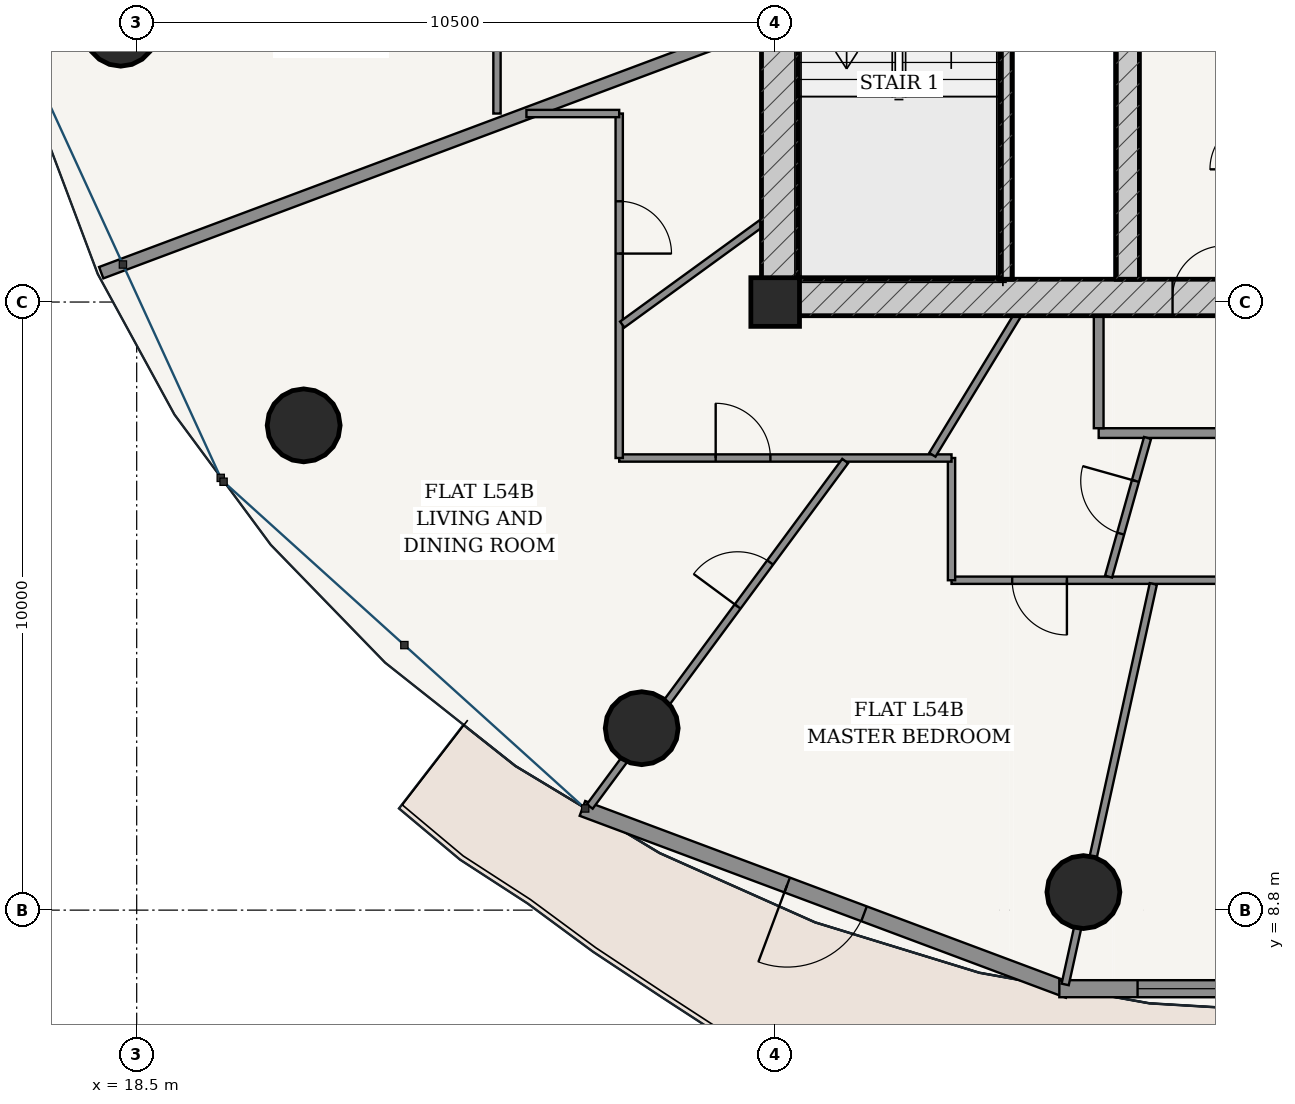
"""IFC4 building model, lengths in metres.
Left out: names, types, materials, properties, quantities, classifications, styles, units other than length and angle.
Written with IfcOpenShell. Run it as: python <this file> out.ifc"""

import sys

from ifc_helpers import new_model, si_unit, direction, frame, frame_2d, origin, origin_2d, place, context, subcontext, project, spatial, rectangle, hollow_circle, extrude, source, transform, mapped, element, fill, save


model = new_model("IFC4")
c1 = context("Model", 3, precision=1e-05, world=origin(), true_north=direction((-0.2419218956, 0.970295726276)))
c2 = subcontext(c1, "Body", "Model", "MODEL_VIEW")
j1 = project(units=[si_unit("LENGTHUNIT", "METRE"), si_unit("PLANEANGLEUNIT", "RADIAN")], contexts=[c1])
p1 = place(None, origin())
s1 = spatial("IfcSite", under=j1, at=p1, CompositionType="ELEMENT")
p2 = place(p1, origin())
s2 = spatial("IfcBuilding", under=s1, at=p2, CompositionType="ELEMENT")
p3 = place(p2, frame((0.0, 0.0, 206.0)))
s3 = spatial("IfcBuildingStorey", under=s2, at=p3, CompositionType="ELEMENT", Elevation=206.0)
p4 = place(p3, frame((29.0, 18.8, 0.0), z_axis=(0.0, 0.0, 1.0), x_axis=(1.0, 0.0, 0.0)))
e1 = element("IfcColumn", 1, at=p4, inside=s3, PredefinedType="COLUMN", context=c2, shape_type="SweptSolid", body=[
    extrude(rectangle(XDim=0.8, YDim=0.8, at=origin_2d()), origin(), (0.0, 0.0, 1.0), 3.7),
])
p5 = place(p3, frame((28.775, 18.875, 0.0), z_axis=(0.0, 0.0, 1.0), x_axis=(1.0, 0.0, 0.0)))
e2 = element("IfcWall", 2, at=p5, inside=s3, PredefinedType="SHEAR", context=c2, shape_type="SweptSolid", body=[
    extrude(rectangle(XDim=18.45, YDim=0.6, at=frame_2d((9.225, 0.0))), origin(), (0.0, 0.0, 1.0), 3.435),
])
p6 = place(p5, frame((6.76, 0.0, 0.0)))
e3 = element("IfcOpeningElement", 3, at=p6, cuts=e2, PredefinedType="OPENING", context=c2, shape_type="SweptSolid", body=[
    extrude(rectangle(XDim=0.85, YDim=2.1, at=frame_2d((0.425, 1.05))), frame((0.0, 0.31, 0.0), z_axis=(0.0, -1.0, 0.0), x_axis=(1.0, 0.0, 0.0)), (0.0, 0.0, 1.0), 0.62),
])
p7 = place(p5, frame((8.8, 0.0, 0.0)))
e4 = element("IfcOpeningElement", 4, at=p7, cuts=e2, PredefinedType="OPENING", context=c2, shape_type="SweptSolid", body=[
    extrude(rectangle(XDim=0.85, YDim=2.1, at=frame_2d((0.425, 1.05))), frame((0.0, 0.31, 0.0), z_axis=(0.0, -1.0, 0.0), x_axis=(1.0, 0.0, 0.0)), (0.0, 0.0, 1.0), 0.62),
])
p8 = place(p5, frame((10.84, 0.0, 0.0)))
e5 = element("IfcOpeningElement", 5, at=p8, cuts=e2, PredefinedType="OPENING", context=c2, shape_type="SweptSolid", body=[
    extrude(rectangle(XDim=0.85, YDim=2.1, at=frame_2d((0.425, 1.05))), frame((0.0, 0.31, 0.0), z_axis=(0.0, -1.0, 0.0), x_axis=(1.0, 0.0, 0.0)), (0.0, 0.0, 1.0), 0.62),
])
p9 = place(p3, frame((29.075, 19.175, 0.0), z_axis=(0.0, 0.0, 1.0), x_axis=(0.0, 1.0, 0.0)))
e6 = element("IfcWall", 6, at=p9, inside=s3, PredefinedType="SHEAR", context=c2, shape_type="SweptSolid", body=[
    extrude(rectangle(XDim=15.25, YDim=0.6, at=frame_2d((7.625, 0.0))), origin(), (0.0, 0.0, 1.0), 3.435),
])
p10 = place(p9, frame((9.875, 0.0, 0.0)))
e7 = element("IfcOpeningElement", 7, at=p10, cuts=e6, PredefinedType="OPENING", context=c2, shape_type="SweptSolid", body=[
    extrude(rectangle(XDim=1.5, YDim=2.2, at=frame_2d((0.75, 1.1))), frame((0.0, 0.31, 0.0), z_axis=(0.0, -1.0, 0.0), x_axis=(1.0, 0.0, 0.0)), (0.0, 0.0, 1.0), 0.62),
])
p11 = place(p3, frame((32.795, 19.175, 0.0), z_axis=(0.0, 0.0, 1.0), x_axis=(0.0, 1.0, 0.0)))
e8 = element("IfcWall", 8, at=p11, inside=s3, PredefinedType="SOLIDWALL", context=c2, shape_type="SweptSolid", body=[
    extrude(rectangle(XDim=7.375, YDim=0.2, at=frame_2d((3.688, 0.0))), origin(), (0.0, 0.0, 1.0), 3.435),
])
p12 = place(p3, frame((34.8, 19.175, 0.0), z_axis=(0.0, 0.0, 1.0), x_axis=(0.0, 1.0, 0.0)))
e9 = element("IfcWall", 9, at=p12, inside=s3, PredefinedType="SHEAR", context=c2, shape_type="SweptSolid", body=[
    extrude(rectangle(XDim=15.25, YDim=0.38, at=frame_2d((7.625, 0.0))), origin(), (0.0, 0.0, 1.0), 3.435),
])
p13 = place(p12, frame((7.8, 0.0, 0.0)))
e10 = element("IfcOpeningElement", 10, at=p13, cuts=e9, PredefinedType="OPENING", context=c2, shape_type="SweptSolid", body=[
    extrude(rectangle(XDim=1.05, YDim=2.15, at=frame_2d((0.525, 1.075))), frame((0.0, 0.2, 0.0), z_axis=(0.0, -1.0, 0.0), x_axis=(1.0, 0.0, 0.0)), (0.0, 0.0, 1.0), 0.4),
])
for number, where, z_axis, x_axis in (
    (11, (18.237, 23.279, 0.0), (0.0, 0.0, 1.0), (1.0, 0.0, 0.0)),
    (12, (21.246, 16.772, 0.0), (0.0, 0.0, 1.0), (1.0, 0.0, 0.0)),
    (13, (26.805, 11.792, 0.0), (0.0, 0.0, 1.0), (1.0, 0.0, 0.0)),
    (14, (34.069, 9.097, 0.0), (0.0, 0.0, 1.0), (1.0, 0.0, 0.0)),
):
    element("IfcColumn", number, at=place(p3, frame(where, z_axis=z_axis, x_axis=x_axis)), inside=s3, PredefinedType="COLUMN", context=c2, shape_type="SweptSolid", body=[
        extrude(hollow_circle(Radius=0.6, WallThickness=0.038, at=origin_2d()), origin(), (0.0, 0.0, 1.0), 3.7),
    ])
p14 = place(p3, frame((25.83, 10.473, 0.0), z_axis=(0.0, 0.0, 1.0), x_axis=(0.936556918375, -0.350515532672, 0.0)))
e15 = element("IfcWall", 15, at=p14, inside=s3, PredefinedType="SOLIDWALL", context=c2, shape_type="SweptSolid", body=[
    extrude(rectangle(XDim=8.539, YDim=0.26, at=frame_2d((4.27, 0.0))), origin(), (0.0, 0.0, 1.0), 3.435),
])
p15 = place(p14, frame((3.594, 0.0, 0.0)))
e16 = element("IfcOpeningElement", 16, at=p15, cuts=e15, PredefinedType="OPENING", context=c2, shape_type="SweptSolid", body=[
    extrude(rectangle(XDim=1.35, YDim=2.2, at=frame_2d((0.675, 1.1))), frame((0.0, 0.14, 0.0), z_axis=(0.0, -1.0, 0.0), x_axis=(1.0, 0.0, 0.0)), (0.0, 0.0, 1.0), 0.28),
])
p16 = place(p3, frame((33.673, 7.508, 0.0), z_axis=(0.0, 0.0, 1.0), x_axis=(1.0, 0.0, 0.0)))
e17 = element("IfcWall", 17, at=p16, inside=s3, PredefinedType="SOLIDWALL", context=c2, shape_type="SweptSolid", body=[
    extrude(rectangle(XDim=8.654, YDim=0.28, at=frame_2d((4.327, 0.0))), origin(), (0.0, 0.0, 1.0), 3.435),
])
p17 = place(p16, frame((1.287, 0.0, 0.85)))
e18 = element("IfcOpeningElement", 18, at=p17, cuts=e17, PredefinedType="OPENING", context=c2, shape_type="SweptSolid", body=[
    extrude(rectangle(XDim=2.1, YDim=1.95, at=frame_2d((1.05, 0.975))), frame((0.0, 0.15, 0.0), z_axis=(0.0, -1.0, 0.0), x_axis=(1.0, 0.0, 0.0)), (0.0, 0.0, 1.0), 0.3),
])
p18 = place(p16, frame((5.268, 0.0, 0.85)))
e19 = element("IfcOpeningElement", 19, at=p18, cuts=e17, PredefinedType="OPENING", context=c2, shape_type="SweptSolid", body=[
    extrude(rectangle(XDim=2.1, YDim=1.95, at=frame_2d((1.05, 0.975))), frame((0.0, 0.15, 0.0), z_axis=(0.0, -1.0, 0.0), x_axis=(1.0, 0.0, 0.0)), (0.0, 0.0, 1.0), 0.3),
])
p19 = place(p3, frame((34.32, 16.645, 0.0), z_axis=(0.0, 0.0, 1.0), x_axis=(1.0, 0.0, 0.0)))
e20 = element("IfcWall", 20, at=p19, inside=s3, PredefinedType="PARTITIONING", context=c2, shape_type="SweptSolid", body=[
    extrude(rectangle(XDim=14.835, YDim=0.16, at=frame_2d((7.417, 0.0))), origin(), (0.0, 0.0, 1.0), 2.951),
])
p20 = place(p19, frame((11.426, 0.0, 0.0)))
e21 = element("IfcOpeningElement", 21, at=p20, cuts=e20, PredefinedType="OPENING", context=c2, shape_type="SweptSolid", body=[
    extrude(rectangle(XDim=0.98, YDim=2.2, at=frame_2d((0.49, 1.1))), frame((0.0, 0.09, 0.0), z_axis=(0.0, -1.0, 0.0), x_axis=(1.0, 0.0, 0.0)), (0.0, 0.0, 1.0), 0.18),
])
p21 = place(p3, frame((34.32, 16.725, 0.0), z_axis=(0.0, 0.0, 1.0), x_axis=(0.0, 1.0, 0.0)))
e22 = element("IfcWall", 22, at=p21, inside=s3, PredefinedType="PARTITIONING", context=c2, shape_type="SweptSolid", body=[
    extrude(rectangle(XDim=1.85, YDim=0.16, at=frame_2d((0.925, 0.0))), origin(), (0.0, 0.0, 1.0), 3.435),
])
p22 = place(p3, frame((24.425, 21.9, 0.0), z_axis=(0.0, 0.0, 1.0), x_axis=(0.0, 1.0, 0.0)))
e23 = element("IfcWall", 23, at=p22, inside=s3, PredefinedType="PARTITIONING", context=c2, shape_type="SweptSolid", body=[
    extrude(rectangle(XDim=15.625, YDim=0.12, at=frame_2d((7.812, 0.0))), origin(), (0.0, 0.0, 1.0), 2.951),
])
p23 = place(p22, frame((11.611, 0.0, 0.0)))
e24 = element("IfcOpeningElement", 24, at=p23, cuts=e23, PredefinedType="OPENING", context=c2, shape_type="SweptSolid", body=[
    extrude(rectangle(XDim=0.9, YDim=2.15, at=frame_2d((0.45, 1.075))), frame((0.0, 0.07, 0.0), z_axis=(0.0, -1.0, 0.0), x_axis=(1.0, 0.0, 0.0)), (0.0, 0.0, 1.0), 0.14),
])
p24 = place(p3, frame((28.775, 23.347, 0.0), z_axis=(0.0, 0.0, 1.0), x_axis=(-0.936537569358, -0.350567227761, 0.0)))
e25 = element("IfcWall", 25, at=p24, inside=s3, PredefinedType="PARTITIONING", context=c2, shape_type="SweptSolid", body=[
    extrude(rectangle(XDim=11.594, YDim=0.2, at=frame_2d((5.797, 0.0))), origin(), (0.0, 0.0, 1.0), 2.951),
])
p25 = place(p3, frame((51.575, 14.225, 0.0), z_axis=(0.0, 0.0, 1.0), x_axis=(-1.0, 0.0, 0.0)))
e26 = element("IfcWall", 26, at=p25, inside=s3, PredefinedType="PARTITIONING", context=c2, shape_type="SweptSolid", body=[
    extrude(rectangle(XDim=19.675, YDim=0.12, at=frame_2d((9.837, 0.0))), origin(), (0.0, 0.0, 1.0), 2.951),
])
p26 = place(p25, frame((3.083, 0.0, 0.0)))
e27 = element("IfcOpeningElement", 27, at=p26, cuts=e26, PredefinedType="OPENING", context=c2, shape_type="SweptSolid", body=[
    extrude(rectangle(XDim=0.9, YDim=2.15, at=frame_2d((0.45, 1.075))), frame((0.0, 0.07, 0.0), z_axis=(0.0, -1.0, 0.0), x_axis=(1.0, 0.0, 0.0)), (0.0, 0.0, 1.0), 0.14),
])
p27 = place(p25, frame((12.063, 0.0, 0.0)))
e28 = element("IfcOpeningElement", 28, at=p27, cuts=e26, PredefinedType="OPENING", context=c2, shape_type="SweptSolid", body=[
    extrude(rectangle(XDim=0.9, YDim=2.15, at=frame_2d((0.45, 1.075))), frame((0.0, 0.07, 0.0), z_axis=(0.0, -1.0, 0.0), x_axis=(1.0, 0.0, 0.0)), (0.0, 0.0, 1.0), 0.14),
])
p28 = place(p25, frame((17.777, 0.0, 0.0)))
e29 = element("IfcOpeningElement", 29, at=p28, cuts=e26, PredefinedType="OPENING", context=c2, shape_type="SweptSolid", body=[
    extrude(rectangle(XDim=0.9, YDim=2.15, at=frame_2d((0.45, 1.075))), frame((0.0, 0.07, 0.0), z_axis=(0.0, -1.0, 0.0), x_axis=(1.0, 0.0, 0.0)), (0.0, 0.0, 1.0), 0.14),
])
p29 = place(p3, frame((31.9, 14.225, 0.0), z_axis=(0.0, 0.0, 1.0), x_axis=(0.0, 1.0, 0.0)))
e30 = element("IfcWall", 30, at=p29, inside=s3, PredefinedType="PARTITIONING", context=c2, shape_type="SweptSolid", body=[
    extrude(rectangle(XDim=2.01, YDim=0.12, at=frame_2d((1.005, 0.0))), origin(), (0.0, 0.0, 1.0), 3.11),
])
p30 = place(p3, frame((31.9, 16.235, 0.0), z_axis=(0.0, 0.0, 1.0), x_axis=(-1.0, 0.0, 0.0)))
e31 = element("IfcWall", 31, at=p30, inside=s3, PredefinedType="PARTITIONING", context=c2, shape_type="SweptSolid", body=[
    extrude(rectangle(XDim=5.465, YDim=0.12, at=frame_2d((2.732, 0.0))), origin(), (0.0, 0.0, 1.0), 2.951),
])
p31 = place(p30, frame((2.979, 0.0, 0.0)))
e32 = element("IfcOpeningElement", 32, at=p31, cuts=e31, PredefinedType="OPENING", context=c2, shape_type="SweptSolid", body=[
    extrude(rectangle(XDim=0.9, YDim=2.15, at=frame_2d((0.45, 1.075))), frame((0.0, 0.07, 0.0), z_axis=(0.0, -1.0, 0.0), x_axis=(1.0, 0.0, 0.0)), (0.0, 0.0, 1.0), 0.14),
])
p32 = place(p3, frame((26.435, 16.235, 0.0), z_axis=(0.0, 0.0, 1.0), x_axis=(0.0, 1.0, 0.0)))
e33 = element("IfcWall", 33, at=p32, inside=s3, PredefinedType="PARTITIONING", context=c2, shape_type="SweptSolid", body=[
    extrude(rectangle(XDim=5.665, YDim=0.12, at=frame_2d((2.833, 0.0))), origin(), (0.0, 0.0, 1.0), 2.951),
])
p33 = place(p32, frame((3.362, 0.0, 0.0)))
e34 = element("IfcOpeningElement", 34, at=p33, cuts=e33, PredefinedType="OPENING", context=c2, shape_type="SweptSolid", body=[
    extrude(rectangle(XDim=0.86, YDim=2.15, at=frame_2d((0.43, 1.075))), frame((0.0, 0.07, 0.0), z_axis=(0.0, -1.0, 0.0), x_axis=(1.0, 0.0, 0.0)), (0.0, 0.0, 1.0), 0.14),
])
p34 = place(p3, frame((26.435, 21.9, 0.0), z_axis=(0.0, 0.0, 1.0), x_axis=(-1.0, 0.0, 0.0)))
e35 = element("IfcWall", 35, at=p34, inside=s3, PredefinedType="PARTITIONING", context=c2, shape_type="SweptSolid", body=[
    extrude(rectangle(XDim=1.526, YDim=0.12, at=frame_2d((0.763, 0.0))), origin(), (0.0, 0.0, 1.0), 3.435),
])
p35 = place(p3, frame((30.151, 16.185, 0.0), z_axis=(0.0, 0.0, 1.0), x_axis=(-0.594540664599, -0.804065543434, 0.0)))
e36 = element("IfcWall", 36, at=p35, inside=s3, PredefinedType="PARTITIONING", context=c2, shape_type="SweptSolid", body=[
    extrude(rectangle(XDim=7.066, YDim=0.12, at=frame_2d((3.533, 0.0))), origin(), (0.0, 0.0, 1.0), 2.951),
])
p36 = place(p35, frame((2.075, 0.0, 0.0)))
e37 = element("IfcOpeningElement", 37, at=p36, cuts=e36, PredefinedType="OPENING", context=c2, shape_type="SweptSolid", body=[
    extrude(rectangle(XDim=0.9, YDim=2.15, at=frame_2d((0.45, 1.075))), frame((0.0, 0.07, 0.0), z_axis=(0.0, -1.0, 0.0), x_axis=(1.0, 0.0, 0.0)), (0.0, 0.0, 1.0), 0.14),
])
p37 = place(p3, frame((35.219, 14.165, 0.0), z_axis=(0.0, 0.0, 1.0), x_axis=(-0.214959845337, -0.976622887758, 0.0)))
e38 = element("IfcWall", 38, at=p37, inside=s3, PredefinedType="PARTITIONING", context=c2, shape_type="SweptSolid", body=[
    extrude(rectangle(XDim=6.744, YDim=0.12, at=frame_2d((3.372, 0.0))), origin(), (0.0, 0.0, 1.0), 2.951),
])
p38 = place(p3, frame((28.775, 20.094, 0.0), z_axis=(0.0, 0.0, 1.0), x_axis=(-0.808862864425, -0.587997335499, 0.0)))
e39 = element("IfcWall", 39, at=p38, inside=s3, PredefinedType="PARTITIONING", context=c2, shape_type="SweptSolid", body=[
    extrude(rectangle(XDim=2.831, YDim=0.12, at=frame_2d((1.416, 0.0))), origin(), (0.0, 0.0, 1.0), 3.435),
])
p39 = place(p3, frame((32.981, 18.575, 0.0), z_axis=(0.0, 0.0, 1.0), x_axis=(-0.520926540997, -0.853601510592, 0.0)))
e40 = element("IfcWall", 40, at=p39, inside=s3, PredefinedType="PARTITIONING", context=c2, shape_type="SweptSolid", body=[
    extrude(rectangle(XDim=2.679, YDim=0.12, at=frame_2d((1.34, 0.0))), origin(), (0.0, 0.0, 1.0), 3.435),
])
p40 = place(p3, frame((35.124, 16.565, 0.0), z_axis=(0.0, 0.0, 1.0), x_axis=(-0.270566477163, -0.962701293982, 0.0)))
e41 = element("IfcWall", 41, at=p40, inside=s3, PredefinedType="PARTITIONING", context=c2, shape_type="SweptSolid", body=[
    extrude(rectangle(XDim=2.369, YDim=0.12, at=frame_2d((1.184, 0.0))), origin(), (0.0, 0.0, 1.0), 3.435),
])
p41 = place(p40, frame((0.734, 0.0, 0.0)))
e42 = element("IfcOpeningElement", 42, at=p41, cuts=e41, PredefinedType="OPENING", context=c2, shape_type="SweptSolid", body=[
    extrude(rectangle(XDim=0.9, YDim=2.15, at=frame_2d((0.45, 1.075))), frame((0.0, 0.07, 0.0), z_axis=(0.0, -1.0, 0.0), x_axis=(1.0, 0.0, 0.0)), (0.0, 0.0, 1.0), 0.14),
])
m1 = source(origin(), c2, "Body", "SweptSolid", [
    extrude(rectangle(XDim=1.35, YDim=2.2, at=frame_2d((0.675, 1.1))), frame((0.0, 0.025, 0.0), z_axis=(0.0, -1.0, 0.0), x_axis=(1.0, 0.0, 0.0)), (0.0, 0.0, 1.0), 0.05),
])
p42 = place(p15, frame((1.35, 0.0, 0.0), z_axis=(0.0, 0.0, 1.0), x_axis=(-1.0, 0.0, 0.0)))
e43 = element("IfcDoor", 43, at=p42, inside=s3, OperationType="SINGLE_SWING_RIGHT", PredefinedType="DOOR", context=c2, shape_type="MappedRepresentation", body=[
    mapped(m1, transform((0.0, 0.0, 0.0), scale=1.0)),
])
fill(e16, e43)
m2 = source(origin(), c2, "Body", "SweptSolid", [
    extrude(rectangle(XDim=2.1, YDim=1.95, at=frame_2d((1.05, 0.975))), frame((0.0, 0.03, 0.0), z_axis=(0.0, -1.0, 0.0), x_axis=(1.0, 0.0, 0.0)), (0.0, 0.0, 1.0), 0.06),
])
p43 = place(p17, origin())
e44 = element("IfcWindow", 44, at=p43, inside=s3, PartitioningType="SINGLE_PANEL", PredefinedType="WINDOW", context=c2, shape_type="MappedRepresentation", body=[
    mapped(m2, transform((0.0, 0.0, 0.0), scale=1.0)),
])
fill(e18, e44)
m3 = source(origin(), c2, "Body", "SweptSolid", [
    extrude(rectangle(XDim=0.85, YDim=2.1, at=frame_2d((0.425, 1.05))), frame((0.0, 0.025, 0.0), z_axis=(0.0, -1.0, 0.0), x_axis=(1.0, 0.0, 0.0)), (0.0, 0.0, 1.0), 0.05),
])
p44 = place(p6, origin())
e45 = element("IfcDoor", 45, at=p44, inside=s3, OperationType="SINGLE_SWING_RIGHT", PredefinedType="DOOR", context=c2, shape_type="MappedRepresentation", body=[
    mapped(m3, transform((0.0, 0.0, 0.0), scale=1.0)),
])
fill(e3, e45)
m4 = source(origin(), c2, "Body", "SweptSolid", [
    extrude(rectangle(XDim=0.9, YDim=2.15, at=frame_2d((0.45, 1.075))), frame((0.0, 0.025, 0.0), z_axis=(0.0, -1.0, 0.0), x_axis=(1.0, 0.0, 0.0)), (0.0, 0.0, 1.0), 0.05),
])
p45 = place(p41, frame((0.9, 0.0, 0.0), z_axis=(0.0, 0.0, 1.0), x_axis=(-1.0, 0.0, 0.0)))
e46 = element("IfcDoor", 46, at=p45, inside=s3, OperationType="SINGLE_SWING_RIGHT", PredefinedType="DOOR", context=c2, shape_type="MappedRepresentation", body=[
    mapped(m4, transform((0.0, 0.0, 0.0), scale=1.0)),
])
fill(e42, e46)
p46 = place(p28, origin())
e47 = element("IfcDoor", 47, at=p46, inside=s3, OperationType="SINGLE_SWING_LEFT", PredefinedType="DOOR", context=c2, shape_type="MappedRepresentation", body=[
    mapped(m4, transform((0.0, 0.0, 0.0), scale=1.0)),
])
fill(e29, e47)
p47 = place(p36, frame((0.9, 0.0, 0.0), z_axis=(0.0, 0.0, 1.0), x_axis=(-1.0, 0.0, 0.0)))
e48 = element("IfcDoor", 48, at=p47, inside=s3, OperationType="SINGLE_SWING_LEFT", PredefinedType="DOOR", context=c2, shape_type="MappedRepresentation", body=[
    mapped(m4, transform((0.0, 0.0, 0.0), scale=1.0)),
])
fill(e37, e48)
m5 = source(origin(), c2, "Body", "SweptSolid", [
    extrude(rectangle(XDim=0.86, YDim=2.15, at=frame_2d((0.43, 1.075))), frame((0.0, 0.025, 0.0), z_axis=(0.0, -1.0, 0.0), x_axis=(1.0, 0.0, 0.0)), (0.0, 0.0, 1.0), 0.05),
])
p48 = place(p33, frame((0.86, 0.0, 0.0), z_axis=(0.0, 0.0, 1.0), x_axis=(-1.0, 0.0, 0.0)))
e49 = element("IfcDoor", 49, at=p48, inside=s3, OperationType="SINGLE_SWING_RIGHT", PredefinedType="DOOR", context=c2, shape_type="MappedRepresentation", body=[
    mapped(m5, transform((0.0, 0.0, 0.0), scale=1.0)),
])
fill(e34, e49)
p49 = place(p31, frame((0.9, 0.0, 0.0), z_axis=(0.0, 0.0, 1.0), x_axis=(-1.0, 0.0, 0.0)))
e50 = element("IfcDoor", 50, at=p49, inside=s3, OperationType="SINGLE_SWING_LEFT", PredefinedType="DOOR", context=c2, shape_type="MappedRepresentation", body=[
    mapped(m4, transform((0.0, 0.0, 0.0), scale=1.0)),
])
fill(e32, e50)
save(model, sys.argv[1])
